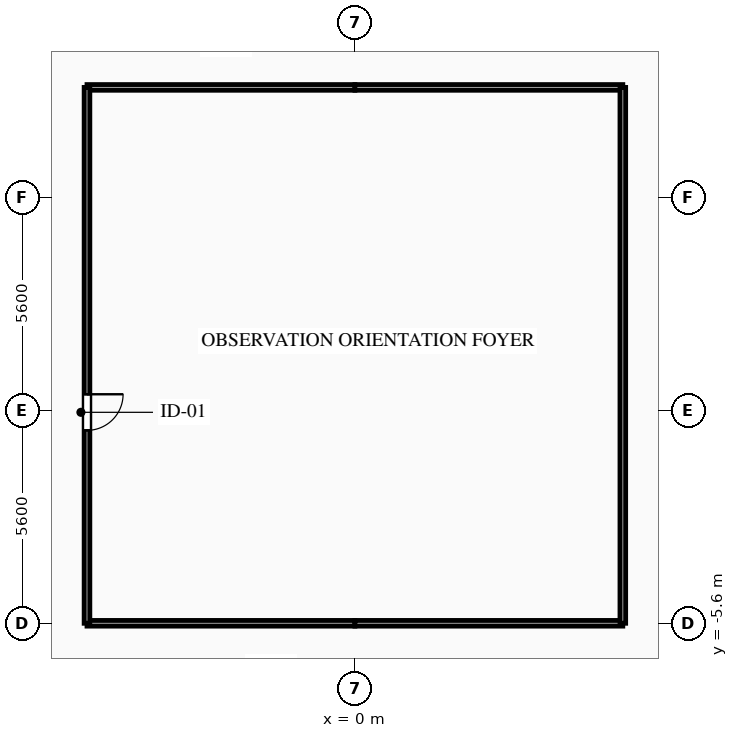
"""IFC4 building model, lengths in metres.
Left out: names, types, materials, properties, quantities, classifications, styles, units other than length and angle.
Written with IfcOpenShell. Run it as: python <this file> out.ifc"""

import sys

from ifc_helpers import new_model, si_unit, direction, frame, frame_2d, origin, place, context, subcontext, project, spatial, rectangle, extrude, element, fill, save


model = new_model("IFC4")
c1 = context("Model", 3, precision=1e-05, world=origin(), true_north=direction((0.0, 1.0)))
c2 = subcontext(c1, "Body", "Model", "MODEL_VIEW")
j1 = project(units=[si_unit("LENGTHUNIT", "METRE"), si_unit("PLANEANGLEUNIT", "RADIAN")], contexts=[c1])
p1 = place(None, origin())
s1 = spatial("IfcSite", under=j1, at=p1, CompositionType="ELEMENT")
p2 = place(p1, origin())
s2 = spatial("IfcBuilding", under=s1, at=p2, CompositionType="ELEMENT")
p3 = place(p2, frame((0.0, 0.0, 261.8)))
s3 = spatial("IfcBuildingStorey", under=s2, at=p3, CompositionType="ELEMENT", Elevation=261.8)
for number, where, z_axis, x_axis in (
    (1, (0.0, 8.5, 0.0), (0.0, 0.0, 1.0), (-1.0, 0.0, 0.0)),
    (2, (7.05, 8.5, 0.0), (0.0, 0.0, 1.0), (-1.0, 0.0, 0.0)),
):
    element("IfcWall", number, at=place(p3, frame(where, z_axis=z_axis, x_axis=x_axis)), inside=s3, PredefinedType="PARTITIONING", context=c2, shape_type="SweptSolid", body=[
        extrude(rectangle(XDim=7.05, YDim=0.15, at=frame_2d((3.525, 0.0))), origin(), (0.0, 0.0, 1.0), 3.78),
    ])
for number, where, z_axis, x_axis in (
    (3, (-7.05, -5.6, 0.0), (0.0, 0.0, 1.0), (1.0, 0.0, 0.0)),
    (4, (0.0, -5.6, 0.0), (0.0, 0.0, 1.0), (1.0, 0.0, 0.0)),
):
    element("IfcWall", number, at=place(p3, frame(where, z_axis=z_axis, x_axis=x_axis)), inside=s3, PredefinedType="PARTITIONING", context=c2, shape_type="SweptSolid", body=[
        extrude(rectangle(XDim=7.05, YDim=0.15, at=frame_2d((3.525, 0.0))), origin(), (0.0, 0.0, 1.0), 3.265),
    ])
p4 = place(p3, frame((-7.05, 8.5, 0.0), z_axis=(0.0, 0.0, 1.0), x_axis=(0.0, -1.0, 0.0)))
e5 = element("IfcWall", 5, at=p4, inside=s3, PredefinedType="PARTITIONING", context=c2, shape_type="SweptSolid", body=[
    extrude(rectangle(XDim=14.1, YDim=0.15, at=frame_2d((7.05, 0.0))), origin(), (0.0, 0.0, 1.0), 3.78),
])
p5 = place(p4, frame((8.074, 0.0, 0.0)))
e6 = element("IfcOpeningElement", 6, at=p5, cuts=e5, PredefinedType="OPENING", context=c2, shape_type="SweptSolid", body=[
    extrude(rectangle(XDim=0.95, YDim=2.1, at=frame_2d((0.475, 1.05))), frame((0.0, 0.085, 0.0), z_axis=(0.0, -1.0, 0.0), x_axis=(1.0, 0.0, 0.0)), (0.0, 0.0, 1.0), 0.17),
])
p6 = place(p3, frame((7.05, -5.6, 0.0), z_axis=(0.0, 0.0, 1.0), x_axis=(0.0, 1.0, 0.0)))
e7 = element("IfcWall", 7, at=p6, inside=s3, PredefinedType="PARTITIONING", context=c2, shape_type="SweptSolid", body=[
    extrude(rectangle(XDim=14.1, YDim=0.15, at=frame_2d((7.05, 0.0))), origin(), (0.0, 0.0, 1.0), 3.78),
])
p7 = place(p5, origin())
e8 = element("IfcDoor", 8, at=p7, inside=s3, OperationType="SINGLE_SWING_LEFT", PredefinedType="DOOR", context=c2, shape_type="SweptSolid", body=[
    extrude(rectangle(XDim=0.95, YDim=2.1, at=frame_2d((0.475, 1.05))), frame((0.0, 0.025, 0.0), z_axis=(0.0, -1.0, 0.0), x_axis=(1.0, 0.0, 0.0)), (0.0, 0.0, 1.0), 0.05),
])
fill(e6, e8)
save(model, sys.argv[1])
